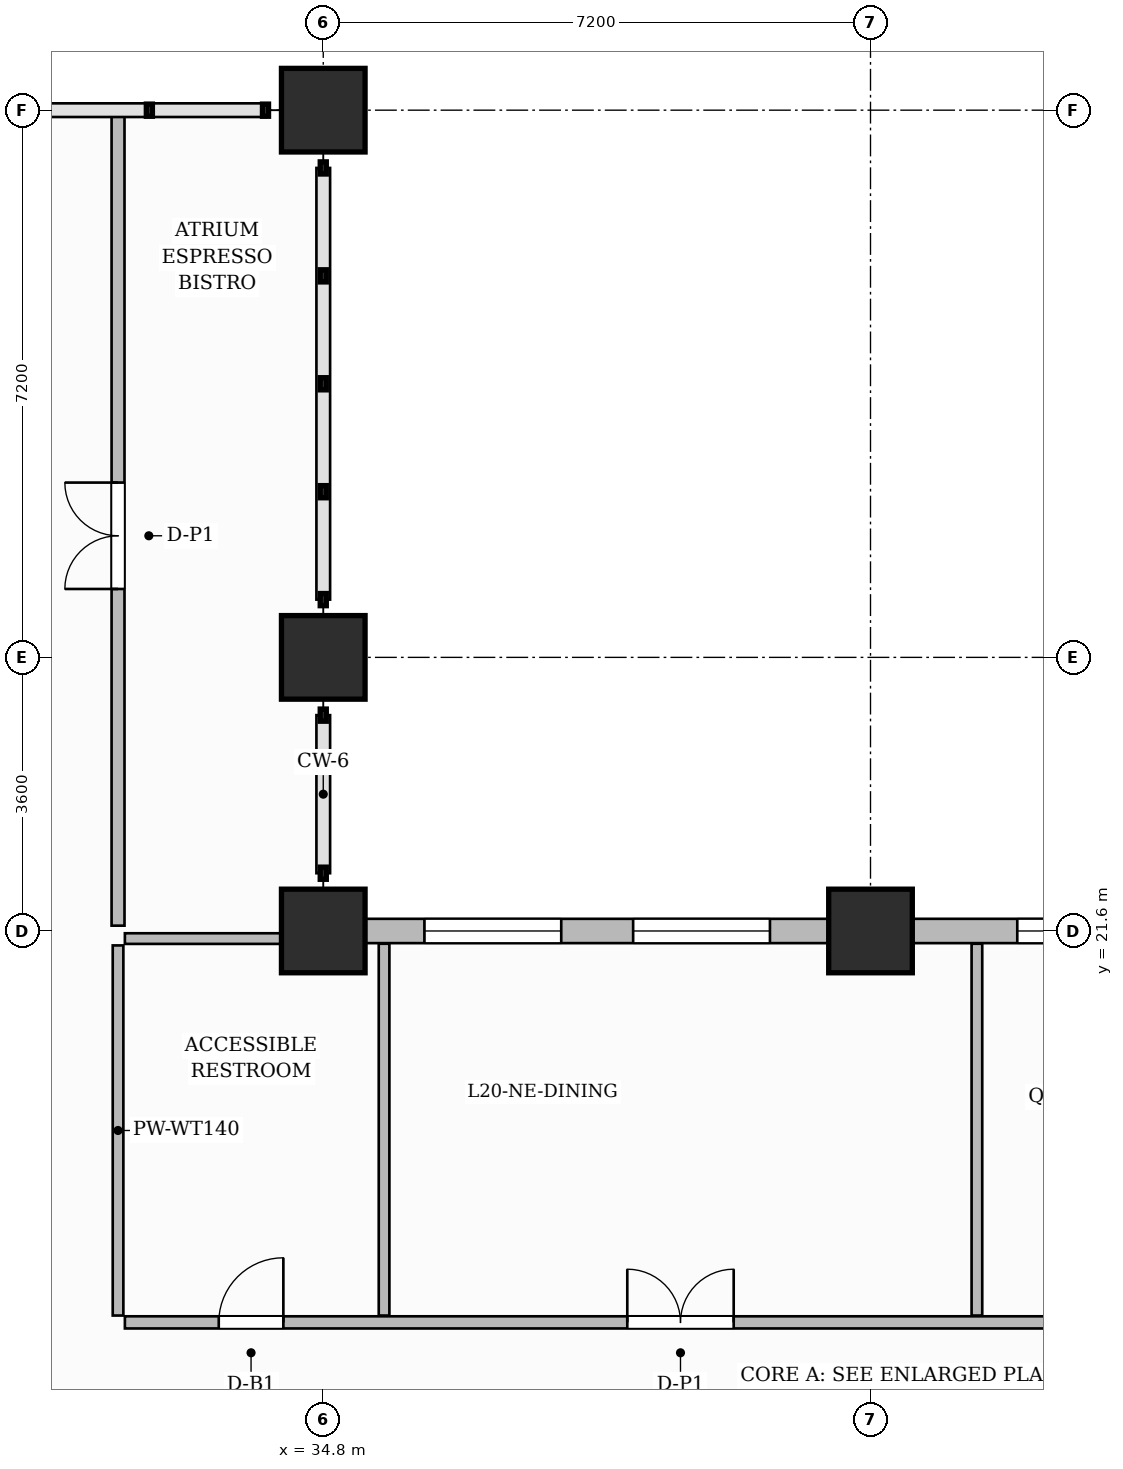
"""IFC4 building model, lengths in metres.
Left out: names, types, materials, properties, quantities, classifications, styles, units other than length and angle.
Written with IfcOpenShell. Run it as: python <this file> out.ifc"""

import sys

from ifc_helpers import new_model, si_unit, direction, frame, frame_2d, origin, origin_2d, place, context, subcontext, project, spatial, rectangle, extrude, source, transform, mapped, element, fill, save


model = new_model("IFC4")
c1 = context("Model", 3, precision=1e-05, world=origin(), true_north=direction((0.0, 1.0)))
c2 = subcontext(c1, "Body", "Model", "MODEL_VIEW")
j1 = project(units=[si_unit("LENGTHUNIT", "METRE"), si_unit("PLANEANGLEUNIT", "RADIAN")], contexts=[c1])
p1 = place(None, origin())
s1 = spatial("IfcSite", under=j1, at=p1, CompositionType="ELEMENT")
p2 = place(p1, origin())
s2 = spatial("IfcBuilding", under=s1, at=p2, CompositionType="ELEMENT")
p3 = place(p2, frame((0.0, 0.0, 84.2)))
s3 = spatial("IfcBuildingStorey", under=s2, at=p3, CompositionType="ELEMENT", Elevation=84.2)
m1 = source(origin(), c2, "Body", "SweptSolid", [
    extrude(rectangle(XDim=1.1, YDim=1.1, at=origin_2d()), origin(), (0.0, 0.0, 1.0), 3.7),
])
for number, where, z_axis, x_axis in (
    (1, (34.8, 21.6, 0.0), (0.0, 0.0, 1.0), (1.0, 0.0, 0.0)),
    (2, (34.8, 25.2, 0.0), (0.0, 0.0, 1.0), (1.0, 0.0, 0.0)),
    (3, (34.8, 32.4, 0.0), (0.0, 0.0, 1.0), (1.0, 0.0, 0.0)),
    (4, (42.0, 21.6, 0.0), (0.0, 0.0, 1.0), (1.0, 0.0, 0.0)),
):
    element("IfcColumn", number, at=place(p3, frame(where, z_axis=z_axis, x_axis=x_axis)), inside=s3, PredefinedType="COLUMN", context=c2, shape_type="MappedRepresentation", body=[
        mapped(m1, transform((0.0, 0.0, 0.0), scale=1.0)),
    ])
p4 = place(p3, frame((32.19, 16.45, 0.0), z_axis=(0.0, 0.0, 1.0), x_axis=(1.0, 0.0, 0.0)))
e5 = element("IfcWall", 5, at=p4, inside=s3, PredefinedType="PARTITIONING", context=c2, shape_type="SweptSolid", body=[
    extrude(rectangle(XDim=17.47, YDim=0.16, at=frame_2d((8.735, 0.0))), origin(), (0.0, 0.0, 1.0), 3.45),
])
p5 = place(p4, frame((1.235, 0.0, 0.0)))
e6 = element("IfcOpeningElement", 6, at=p5, cuts=e5, PredefinedType="OPENING", context=c2, shape_type="SweptSolid", body=[
    extrude(rectangle(XDim=0.85, YDim=2.1, at=frame_2d((0.425, 1.05))), frame((0.0, 0.09, 0.0), z_axis=(0.0, -1.0, 0.0), x_axis=(1.0, 0.0, 0.0)), (0.0, 0.0, 1.0), 0.18),
])
p6 = place(p4, frame((6.61, 0.0, 0.0)))
e7 = element("IfcOpeningElement", 7, at=p6, cuts=e5, PredefinedType="OPENING", context=c2, shape_type="SweptSolid", body=[
    extrude(rectangle(XDim=1.4, YDim=2.35, at=frame_2d((0.7, 1.175))), frame((0.0, 0.09, 0.0), z_axis=(0.0, -1.0, 0.0), x_axis=(1.0, 0.0, 0.0)), (0.0, 0.0, 1.0), 0.18),
])
p7 = place(p4, frame((13.885, 0.0, 0.0)))
e8 = element("IfcOpeningElement", 8, at=p7, cuts=e5, PredefinedType="OPENING", context=c2, shape_type="SweptSolid", body=[
    extrude(rectangle(XDim=0.95, YDim=2.15, at=frame_2d((0.475, 1.075))), frame((0.0, 0.09, 0.0), z_axis=(0.0, -1.0, 0.0), x_axis=(1.0, 0.0, 0.0)), (0.0, 0.0, 1.0), 0.18),
])
p8 = place(p3, frame((32.1, 16.54, 0.0), z_axis=(0.0, 0.0, 1.0), x_axis=(0.0, 1.0, 0.0)))
e9 = element("IfcWall", 9, at=p8, inside=s3, PredefinedType="PARTITIONING", context=c2, shape_type="SweptSolid", body=[
    extrude(rectangle(XDim=4.87, YDim=0.14, at=frame_2d((2.435, 0.0))), origin(), (0.0, 0.0, 1.0), 3.45),
])
for number, where, z_axis, x_axis in (
    (10, (35.6, 16.54, 0.0), (0.0, 0.0, 1.0), (0.0, 1.0, 0.0)),
    (11, (43.4, 16.54, 0.0), (0.0, 0.0, 1.0), (0.0, 1.0, 0.0)),
):
    element("IfcWall", number, at=place(p3, frame(where, z_axis=z_axis, x_axis=x_axis)), inside=s3, PredefinedType="PARTITIONING", context=c2, shape_type="SweptSolid", body=[
        extrude(rectangle(XDim=4.892, YDim=0.14, at=frame_2d((2.446, 0.0))), origin(), (0.0, 0.0, 1.0), 3.45),
    ])
p9 = place(p3, frame((32.19, 21.5, 0.0), z_axis=(0.0, 0.0, 1.0), x_axis=(1.0, 0.0, 0.0)))
e12 = element("IfcWall", 12, at=p9, inside=s3, PredefinedType="PARTITIONING", context=c2, shape_type="SweptSolid", body=[
    extrude(rectangle(XDim=2.42, YDim=0.14, at=frame_2d((1.21, 0.0))), origin(), (0.0, 0.0, 1.0), 2.885),
])
p10 = place(p3, frame((32.1, 21.67, 0.0), z_axis=(0.0, 0.0, 1.0), x_axis=(0.0, 1.0, 0.0)))
e13 = element("IfcWall", 13, at=p10, inside=s3, PredefinedType="PARTITIONING", context=c2, shape_type="SweptSolid", body=[
    extrude(rectangle(XDim=10.702, YDim=0.17, at=frame_2d((5.351, 0.0))), origin(), (0.0, 0.0, 1.0), 3.45),
])
p11 = place(p10, frame((4.43, 0.0, 0.0)))
e14 = element("IfcOpeningElement", 14, at=p11, cuts=e13, PredefinedType="OPENING", context=c2, shape_type="SweptSolid", body=[
    extrude(rectangle(XDim=1.4, YDim=2.35, at=frame_2d((0.7, 1.175))), frame((0.0, 0.095, 0.0), z_axis=(0.0, -1.0, 0.0), x_axis=(1.0, 0.0, 0.0)), (0.0, 0.0, 1.0), 0.19),
])
p12 = place(p3, frame((34.8, 21.6, 0.0), z_axis=(0.0, 0.0, 1.0), x_axis=(1.0, 0.0, 0.0)))
e15 = element("IfcWall", 15, at=p12, inside=s3, PredefinedType="SOLIDWALL", context=c2, shape_type="SweptSolid", body=[
    extrude(rectangle(XDim=22.8, YDim=0.32, at=frame_2d((11.4, 0.0))), origin(), (0.0, 0.0, 1.0), 2.885),
])
p13 = place(p12, frame((1.331, 0.0, 0.8)))
e16 = element("IfcOpeningElement", 16, at=p13, cuts=e15, PredefinedType="OPENING", context=c2, shape_type="SweptSolid", body=[
    extrude(rectangle(XDim=1.8, YDim=1.85, at=frame_2d((0.9, 0.925))), frame((0.0, 0.17, 0.0), z_axis=(0.0, -1.0, 0.0), x_axis=(1.0, 0.0, 0.0)), (0.0, 0.0, 1.0), 0.34),
])
p14 = place(p12, frame((4.077, 0.0, 0.8)))
e17 = element("IfcOpeningElement", 17, at=p14, cuts=e15, PredefinedType="OPENING", context=c2, shape_type="SweptSolid", body=[
    extrude(rectangle(XDim=1.8, YDim=1.85, at=frame_2d((0.9, 0.925))), frame((0.0, 0.17, 0.0), z_axis=(0.0, -1.0, 0.0), x_axis=(1.0, 0.0, 0.0)), (0.0, 0.0, 1.0), 0.34),
])
p15 = place(p12, frame((9.131, 0.0, 0.8)))
e18 = element("IfcOpeningElement", 18, at=p15, cuts=e15, PredefinedType="OPENING", context=c2, shape_type="SweptSolid", body=[
    extrude(rectangle(XDim=1.8, YDim=1.85, at=frame_2d((0.9, 0.925))), frame((0.0, 0.17, 0.0), z_axis=(0.0, -1.0, 0.0), x_axis=(1.0, 0.0, 0.0)), (0.0, 0.0, 1.0), 0.34),
])
p16 = place(p12, frame((11.877, 0.0, 0.8)))
e19 = element("IfcOpeningElement", 19, at=p16, cuts=e15, PredefinedType="OPENING", context=c2, shape_type="SweptSolid", body=[
    extrude(rectangle(XDim=1.8, YDim=1.85, at=frame_2d((0.9, 0.925))), frame((0.0, 0.17, 0.0), z_axis=(0.0, -1.0, 0.0), x_axis=(1.0, 0.0, 0.0)), (0.0, 0.0, 1.0), 0.34),
])
p17 = place(p12, frame((16.475, 0.0, 0.8)))
e20 = element("IfcOpeningElement", 20, at=p17, cuts=e15, PredefinedType="OPENING", context=c2, shape_type="SweptSolid", body=[
    extrude(rectangle(XDim=1.8, YDim=1.85, at=frame_2d((0.9, 0.925))), frame((0.0, 0.17, 0.0), z_axis=(0.0, -1.0, 0.0), x_axis=(1.0, 0.0, 0.0)), (0.0, 0.0, 1.0), 0.34),
])
p18 = place(p12, frame((19.525, 0.0, 0.8)))
e21 = element("IfcOpeningElement", 21, at=p18, cuts=e15, PredefinedType="OPENING", context=c2, shape_type="SweptSolid", body=[
    extrude(rectangle(XDim=1.8, YDim=1.85, at=frame_2d((0.9, 0.925))), frame((0.0, 0.17, 0.0), z_axis=(0.0, -1.0, 0.0), x_axis=(1.0, 0.0, 0.0)), (0.0, 0.0, 1.0), 0.34),
])
m2 = source(origin(), c2, "Body", "SweptSolid", [
    extrude(rectangle(XDim=0.85, YDim=2.1, at=frame_2d((0.425, 1.05))), frame((0.0, 0.025, 0.0), z_axis=(0.0, -1.0, 0.0), x_axis=(1.0, 0.0, 0.0)), (0.0, 0.0, 1.0), 0.05),
])
p19 = place(p5, origin())
e22 = element("IfcDoor", 22, at=p19, inside=s3, OperationType="SINGLE_SWING_RIGHT", PredefinedType="DOOR", context=c2, shape_type="MappedRepresentation", body=[
    mapped(m2, transform((0.0, 0.0, 0.0), scale=1.0)),
])
fill(e6, e22)
m3 = source(origin(), c2, "Body", "SweptSolid", [
    extrude(rectangle(XDim=1.4, YDim=2.35, at=frame_2d((0.7, 1.175))), frame((0.0, 0.025, 0.0), z_axis=(0.0, -1.0, 0.0), x_axis=(1.0, 0.0, 0.0)), (0.0, 0.0, 1.0), 0.05),
])
p20 = place(p6, origin())
e23 = element("IfcDoor", 23, at=p20, inside=s3, OperationType="DOUBLE_DOOR_SINGLE_SWING", PredefinedType="DOOR", context=c2, shape_type="MappedRepresentation", body=[
    mapped(m3, transform((0.0, 0.0, 0.0), scale=1.0)),
])
fill(e7, e23)
p21 = place(p11, origin())
e24 = element("IfcDoor", 24, at=p21, inside=s3, OperationType="DOUBLE_DOOR_SINGLE_SWING", PredefinedType="DOOR", context=c2, shape_type="MappedRepresentation", body=[
    mapped(m3, transform((0.0, 0.0, 0.0), scale=1.0)),
])
fill(e14, e24)
m4 = source(origin(), c2, "Body", "SweptSolid", [
    extrude(rectangle(XDim=1.8, YDim=1.85, at=frame_2d((0.9, 0.925))), frame((0.0, 0.03, 0.0), z_axis=(0.0, -1.0, 0.0), x_axis=(1.0, 0.0, 0.0)), (0.0, 0.0, 1.0), 0.06),
])
p22 = place(p13, origin())
e25 = element("IfcWindow", 25, at=p22, inside=s3, PartitioningType="DOUBLE_PANEL_VERTICAL", PredefinedType="WINDOW", context=c2, shape_type="MappedRepresentation", body=[
    mapped(m4, transform((0.0, 0.0, 0.0), scale=1.0)),
])
fill(e16, e25)
p23 = place(p14, origin())
e26 = element("IfcWindow", 26, at=p23, inside=s3, PartitioningType="DOUBLE_PANEL_VERTICAL", PredefinedType="WINDOW", context=c2, shape_type="MappedRepresentation", body=[
    mapped(m4, transform((0.0, 0.0, 0.0), scale=1.0)),
])
fill(e17, e26)
p24 = place(p15, origin())
e27 = element("IfcWindow", 27, at=p24, inside=s3, PartitioningType="DOUBLE_PANEL_VERTICAL", PredefinedType="WINDOW", context=c2, shape_type="MappedRepresentation", body=[
    mapped(m4, transform((0.0, 0.0, 0.0), scale=1.0)),
])
fill(e18, e27)
save(model, sys.argv[1])
